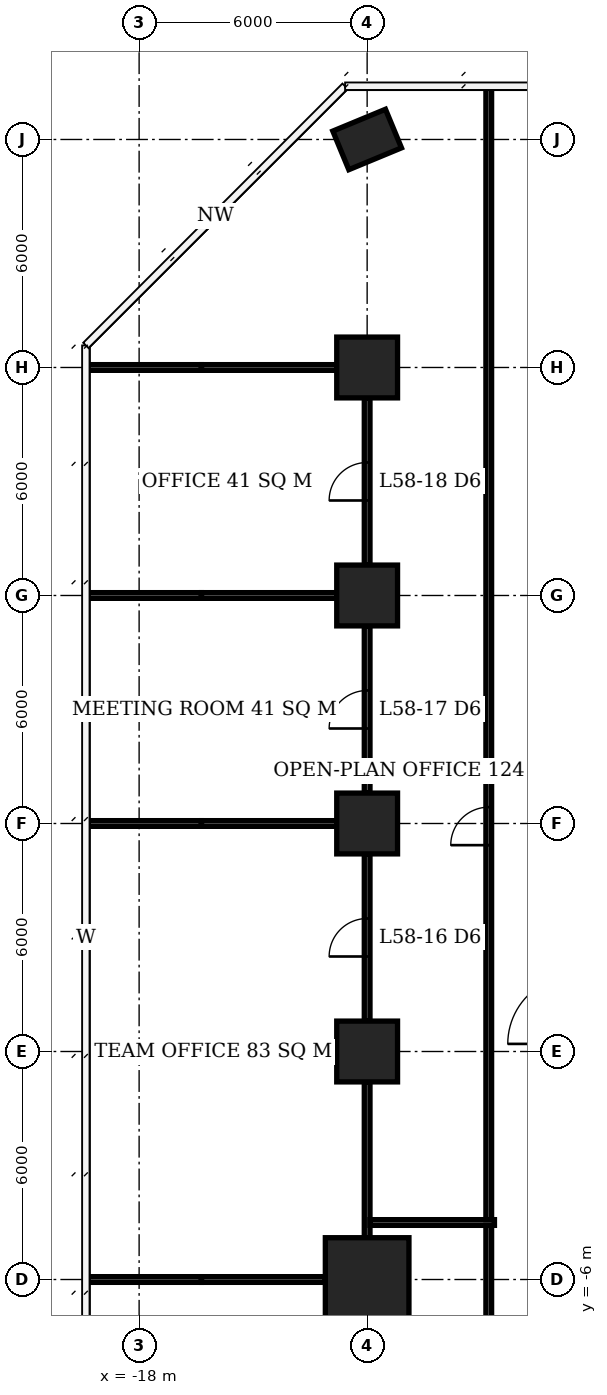
"""IFC4 building model, lengths in metres.
Left out: names, types, materials, properties, quantities, classifications, styles, units other than length and angle.
Written with IfcOpenShell. Run it as: python <this file> out.ifc"""

import sys

from ifc_helpers import new_model, si_unit, direction, frame, frame_2d, origin, origin_2d, place, context, subcontext, project, spatial, rectangle, extrude, element, fill, save


model = new_model("IFC4")
c1 = context("Model", 3, precision=1e-05, world=origin(), true_north=direction((0.0, 1.0)))
c2 = subcontext(c1, "Body", "Model", "MODEL_VIEW")
j1 = project(units=[si_unit("LENGTHUNIT", "METRE"), si_unit("PLANEANGLEUNIT", "RADIAN")], contexts=[c1])
p1 = place(None, origin())
s1 = spatial("IfcSite", under=j1, at=p1, CompositionType="ELEMENT")
p2 = place(p1, origin())
s2 = spatial("IfcBuilding", under=s1, at=p2, CompositionType="ELEMENT")
p3 = place(p2, frame((0.0, 0.0, 235.7)))
s3 = spatial("IfcBuildingStorey", under=s2, at=p3, CompositionType="ELEMENT", Elevation=235.7)
p4 = place(p3, frame((-12.0, -6.0, 0.0), z_axis=(0.0, 0.0, 1.0), x_axis=(1.0, 0.0, 0.0)))
e1 = element("IfcColumn", 1, at=p4, inside=s3, PredefinedType="COLUMN", context=c2, shape_type="SweptSolid", body=[
    extrude(rectangle(XDim=2.2, YDim=2.2, at=origin_2d()), origin(), (0.0, 0.0, 1.0), 3.9),
])
for number, where, z_axis, x_axis in (
    (2, (-12.0, 0.0, 0.0), (0.0, 0.0, 1.0), (1.0, 0.0, 0.0)),
    (3, (-12.0, 6.0, 0.0), (0.0, 0.0, 1.0), (1.0, 0.0, 0.0)),
    (4, (-12.0, 12.0, 0.0), (0.0, 0.0, 1.0), (1.0, 0.0, 0.0)),
    (5, (-12.0, 18.0, 0.0), (0.0, 0.0, 1.0), (1.0, 0.0, 0.0)),
):
    element("IfcColumn", number, at=place(p3, frame(where, z_axis=z_axis, x_axis=x_axis)), inside=s3, PredefinedType="COLUMN", context=c2, shape_type="SweptSolid", body=[
        extrude(rectangle(XDim=1.6, YDim=1.6, at=origin_2d()), origin(), (0.0, 0.0, 1.0), 3.9),
    ])
p5 = place(p3, frame((-12.0, 24.0, 0.0), z_axis=(0.0, 0.0, 1.0), x_axis=(0.923879532511, 0.382683432365, 0.0)))
e6 = element("IfcColumn", 6, at=p5, inside=s3, PredefinedType="COLUMN", context=c2, shape_type="SweptSolid", body=[
    extrude(rectangle(XDim=1.5, YDim=1.1, at=origin_2d()), origin(), (0.0, 0.0, 1.0), 3.9),
])
p6 = place(p3, frame((-19.4, -6.0, 0.0), z_axis=(0.0, 0.0, 1.0), x_axis=(1.0, 0.0, 0.0)))
e7 = element("IfcWall", 7, at=p6, inside=s3, PredefinedType="PARTITIONING", context=c2, shape_type="SweptSolid", body=[
    extrude(rectangle(XDim=3.04, YDim=0.15, at=frame_2d((1.52, 0.0))), origin(), (0.0, 0.0, 1.0), 3.65),
])
p7 = place(p3, frame((-16.36, -6.0, 0.0), z_axis=(0.0, 0.0, 1.0), x_axis=(1.0, 0.0, 0.0)))
e8 = element("IfcWall", 8, at=p7, inside=s3, PredefinedType="PARTITIONING", context=c2, shape_type="SweptSolid", body=[
    extrude(rectangle(XDim=3.26, YDim=0.15, at=frame_2d((1.63, 0.0))), origin(), (0.0, 0.0, 1.0), 2.15),
])
p8 = place(p3, frame((-19.35, 6.0, 0.0), z_axis=(0.0, 0.0, 1.0), x_axis=(1.0, 0.0, 0.0)))
e9 = element("IfcWall", 9, at=p8, inside=s3, PredefinedType="PARTITIONING", context=c2, shape_type="SweptSolid", body=[
    extrude(rectangle(XDim=2.99, YDim=0.15, at=frame_2d((1.495, 0.0))), origin(), (0.0, 0.0, 1.0), 3.65),
])
p9 = place(p3, frame((-16.36, 6.0, 0.0), z_axis=(0.0, 0.0, 1.0), x_axis=(1.0, 0.0, 0.0)))
e10 = element("IfcWall", 10, at=p9, inside=s3, PredefinedType="PARTITIONING", context=c2, shape_type="SweptSolid", body=[
    extrude(rectangle(XDim=3.56, YDim=0.15, at=frame_2d((1.78, 0.0))), origin(), (0.0, 0.0, 1.0), 2.15),
])
p10 = place(p3, frame((-19.4, 12.0, 0.0), z_axis=(0.0, 0.0, 1.0), x_axis=(1.0, 0.0, 0.0)))
e11 = element("IfcWall", 11, at=p10, inside=s3, PredefinedType="PARTITIONING", context=c2, shape_type="SweptSolid", body=[
    extrude(rectangle(XDim=3.04, YDim=0.15, at=frame_2d((1.52, 0.0))), origin(), (0.0, 0.0, 1.0), 3.65),
])
p11 = place(p3, frame((-16.36, 12.0, 0.0), z_axis=(0.0, 0.0, 1.0), x_axis=(1.0, 0.0, 0.0)))
e12 = element("IfcWall", 12, at=p11, inside=s3, PredefinedType="PARTITIONING", context=c2, shape_type="SweptSolid", body=[
    extrude(rectangle(XDim=3.56, YDim=0.15, at=frame_2d((1.78, 0.0))), origin(), (0.0, 0.0, 1.0), 2.15),
])
p12 = place(p3, frame((-19.4, 18.0, 0.0), z_axis=(0.0, 0.0, 1.0), x_axis=(1.0, 0.0, 0.0)))
e13 = element("IfcWall", 13, at=p12, inside=s3, PredefinedType="PARTITIONING", context=c2, shape_type="SweptSolid", body=[
    extrude(rectangle(XDim=3.04, YDim=0.15, at=frame_2d((1.52, 0.0))), origin(), (0.0, 0.0, 1.0), 3.65),
])
p13 = place(p3, frame((-16.36, 18.0, 0.0), z_axis=(0.0, 0.0, 1.0), x_axis=(1.0, 0.0, 0.0)))
e14 = element("IfcWall", 14, at=p13, inside=s3, PredefinedType="PARTITIONING", context=c2, shape_type="SweptSolid", body=[
    extrude(rectangle(XDim=3.56, YDim=0.15, at=frame_2d((1.78, 0.0))), origin(), (0.0, 0.0, 1.0), 2.15),
])
p14 = place(p3, frame((-12.0, -4.915, 0.0), z_axis=(0.0, 0.0, 1.0), x_axis=(0.0, 1.0, 0.0)))
e15 = element("IfcWall", 15, at=p14, inside=s3, PredefinedType="PARTITIONING", context=c2, shape_type="SweptSolid", body=[
    extrude(rectangle(XDim=4.115, YDim=0.15, at=frame_2d((2.058, 0.0))), origin(), (0.0, 0.0, 1.0), 3.65),
])
p15 = place(p3, frame((-12.0, 0.8, 0.0), z_axis=(0.0, 0.0, 1.0), x_axis=(0.0, 1.0, 0.0)))
e16 = element("IfcWall", 16, at=p15, inside=s3, PredefinedType="PARTITIONING", context=c2, shape_type="SweptSolid", body=[
    extrude(rectangle(XDim=4.4, YDim=0.15, at=frame_2d((2.2, 0.0))), origin(), (0.0, 0.0, 1.0), 3.65),
])
p16 = place(p15, frame((1.7, 0.0, 0.0)))
e17 = element("IfcOpeningElement", 17, at=p16, cuts=e16, PredefinedType="OPENING", context=c2, shape_type="SweptSolid", body=[
    extrude(rectangle(XDim=1.0, YDim=2.1, at=frame_2d((0.5, 1.05))), frame((0.0, 0.085, 0.0), z_axis=(0.0, -1.0, 0.0), x_axis=(1.0, 0.0, 0.0)), (0.0, 0.0, 1.0), 0.17),
])
p17 = place(p3, frame((-12.0, 6.8, 0.0), z_axis=(0.0, 0.0, 1.0), x_axis=(0.0, 1.0, 0.0)))
e18 = element("IfcWall", 18, at=p17, inside=s3, PredefinedType="PARTITIONING", context=c2, shape_type="SweptSolid", body=[
    extrude(rectangle(XDim=4.4, YDim=0.15, at=frame_2d((2.2, 0.0))), origin(), (0.0, 0.0, 1.0), 3.65),
])
p18 = place(p17, frame((1.7, 0.0, 0.0)))
e19 = element("IfcOpeningElement", 19, at=p18, cuts=e18, PredefinedType="OPENING", context=c2, shape_type="SweptSolid", body=[
    extrude(rectangle(XDim=1.0, YDim=2.1, at=frame_2d((0.5, 1.05))), frame((0.0, 0.085, 0.0), z_axis=(0.0, -1.0, 0.0), x_axis=(1.0, 0.0, 0.0)), (0.0, 0.0, 1.0), 0.17),
])
p19 = place(p3, frame((-12.0, 12.8, 0.0), z_axis=(0.0, 0.0, 1.0), x_axis=(0.0, 1.0, 0.0)))
e20 = element("IfcWall", 20, at=p19, inside=s3, PredefinedType="PARTITIONING", context=c2, shape_type="SweptSolid", body=[
    extrude(rectangle(XDim=4.4, YDim=0.15, at=frame_2d((2.2, 0.0))), origin(), (0.0, 0.0, 1.0), 3.65),
])
p20 = place(p19, frame((1.7, 0.0, 0.0)))
e21 = element("IfcOpeningElement", 21, at=p20, cuts=e20, PredefinedType="OPENING", context=c2, shape_type="SweptSolid", body=[
    extrude(rectangle(XDim=1.0, YDim=2.1, at=frame_2d((0.5, 1.05))), frame((0.0, 0.085, 0.0), z_axis=(0.0, -1.0, 0.0), x_axis=(1.0, 0.0, 0.0)), (0.0, 0.0, 1.0), 0.17),
])
p21 = place(p3, frame((-11.925, -4.5, 0.0), z_axis=(0.0, 0.0, 1.0), x_axis=(1.0, 0.0, 0.0)))
e22 = element("IfcWall", 22, at=p21, inside=s3, PredefinedType="PARTITIONING", context=c2, shape_type="SweptSolid", body=[
    extrude(rectangle(XDim=3.275, YDim=0.15, at=frame_2d((1.638, 0.0))), origin(), (0.0, 0.0, 1.0), 3.65),
])
p22 = place(p3, frame((-8.8, -10.425, 0.0), z_axis=(0.0, 0.0, 1.0), x_axis=(0.0, 1.0, 0.0)))
e23 = element("IfcWall", 23, at=p22, inside=s3, PredefinedType="PARTITIONING", context=c2, shape_type="SweptSolid", body=[
    extrude(rectangle(XDim=5.85, YDim=0.15, at=frame_2d((2.925, 0.0))), origin(), (0.0, 0.0, 1.0), 3.65),
])
p23 = place(p22, frame((1.525, 0.0, 0.0)))
e24 = element("IfcOpeningElement", 24, at=p23, cuts=e23, PredefinedType="OPENING", context=c2, shape_type="SweptSolid", body=[
    extrude(rectangle(XDim=1.0, YDim=2.1, at=frame_2d((0.5, 1.05))), frame((0.0, 0.085, 0.0), z_axis=(0.0, -1.0, 0.0), x_axis=(1.0, 0.0, 0.0)), (0.0, 0.0, 1.0), 0.17),
])
p24 = place(p3, frame((-8.8, -4.425, 0.0), z_axis=(0.0, 0.0, 1.0), x_axis=(0.0, 1.0, 0.0)))
e25 = element("IfcWall", 25, at=p24, inside=s3, PredefinedType="PARTITIONING", context=c2, shape_type="SweptSolid", body=[
    extrude(rectangle(XDim=29.825, YDim=0.15, at=frame_2d((14.913, 0.0))), origin(), (0.0, 0.0, 1.0), 3.65),
])
p25 = place(p24, frame((9.855, 0.0, 0.0)))
e26 = element("IfcOpeningElement", 26, at=p25, cuts=e25, PredefinedType="OPENING", context=c2, shape_type="SweptSolid", body=[
    extrude(rectangle(XDim=1.0, YDim=2.1, at=frame_2d((0.5, 1.05))), frame((0.0, 0.085, 0.0), z_axis=(0.0, -1.0, 0.0), x_axis=(1.0, 0.0, 0.0)), (0.0, 0.0, 1.0), 0.17),
])
p26 = place(p16, origin())
e27 = element("IfcDoor", 27, at=p26, inside=s3, OperationType="SINGLE_SWING_LEFT", PredefinedType="DOOR", context=c2, shape_type="SweptSolid", body=[
    extrude(rectangle(XDim=1.0, YDim=2.1, at=frame_2d((0.5, 1.05))), frame((0.0, 0.025, 0.0), z_axis=(0.0, -1.0, 0.0), x_axis=(1.0, 0.0, 0.0)), (0.0, 0.0, 1.0), 0.05),
])
fill(e17, e27)
p27 = place(p18, origin())
e28 = element("IfcDoor", 28, at=p27, inside=s3, OperationType="SINGLE_SWING_LEFT", PredefinedType="DOOR", context=c2, shape_type="SweptSolid", body=[
    extrude(rectangle(XDim=1.0, YDim=2.1, at=frame_2d((0.5, 1.05))), frame((0.0, 0.025, 0.0), z_axis=(0.0, -1.0, 0.0), x_axis=(1.0, 0.0, 0.0)), (0.0, 0.0, 1.0), 0.05),
])
fill(e19, e28)
p28 = place(p20, origin())
e29 = element("IfcDoor", 29, at=p28, inside=s3, OperationType="SINGLE_SWING_LEFT", PredefinedType="DOOR", context=c2, shape_type="SweptSolid", body=[
    extrude(rectangle(XDim=1.0, YDim=2.1, at=frame_2d((0.5, 1.05))), frame((0.0, 0.025, 0.0), z_axis=(0.0, -1.0, 0.0), x_axis=(1.0, 0.0, 0.0)), (0.0, 0.0, 1.0), 0.05),
])
fill(e21, e29)
p29 = place(p25, origin())
e30 = element("IfcDoor", 30, at=p29, inside=s3, OperationType="SINGLE_SWING_LEFT", PredefinedType="DOOR", context=c2, shape_type="SweptSolid", body=[
    extrude(rectangle(XDim=1.0, YDim=2.1, at=frame_2d((0.5, 1.05))), frame((0.0, 0.025, 0.0), z_axis=(0.0, -1.0, 0.0), x_axis=(1.0, 0.0, 0.0)), (0.0, 0.0, 1.0), 0.05),
])
fill(e26, e30)
save(model, sys.argv[1])
